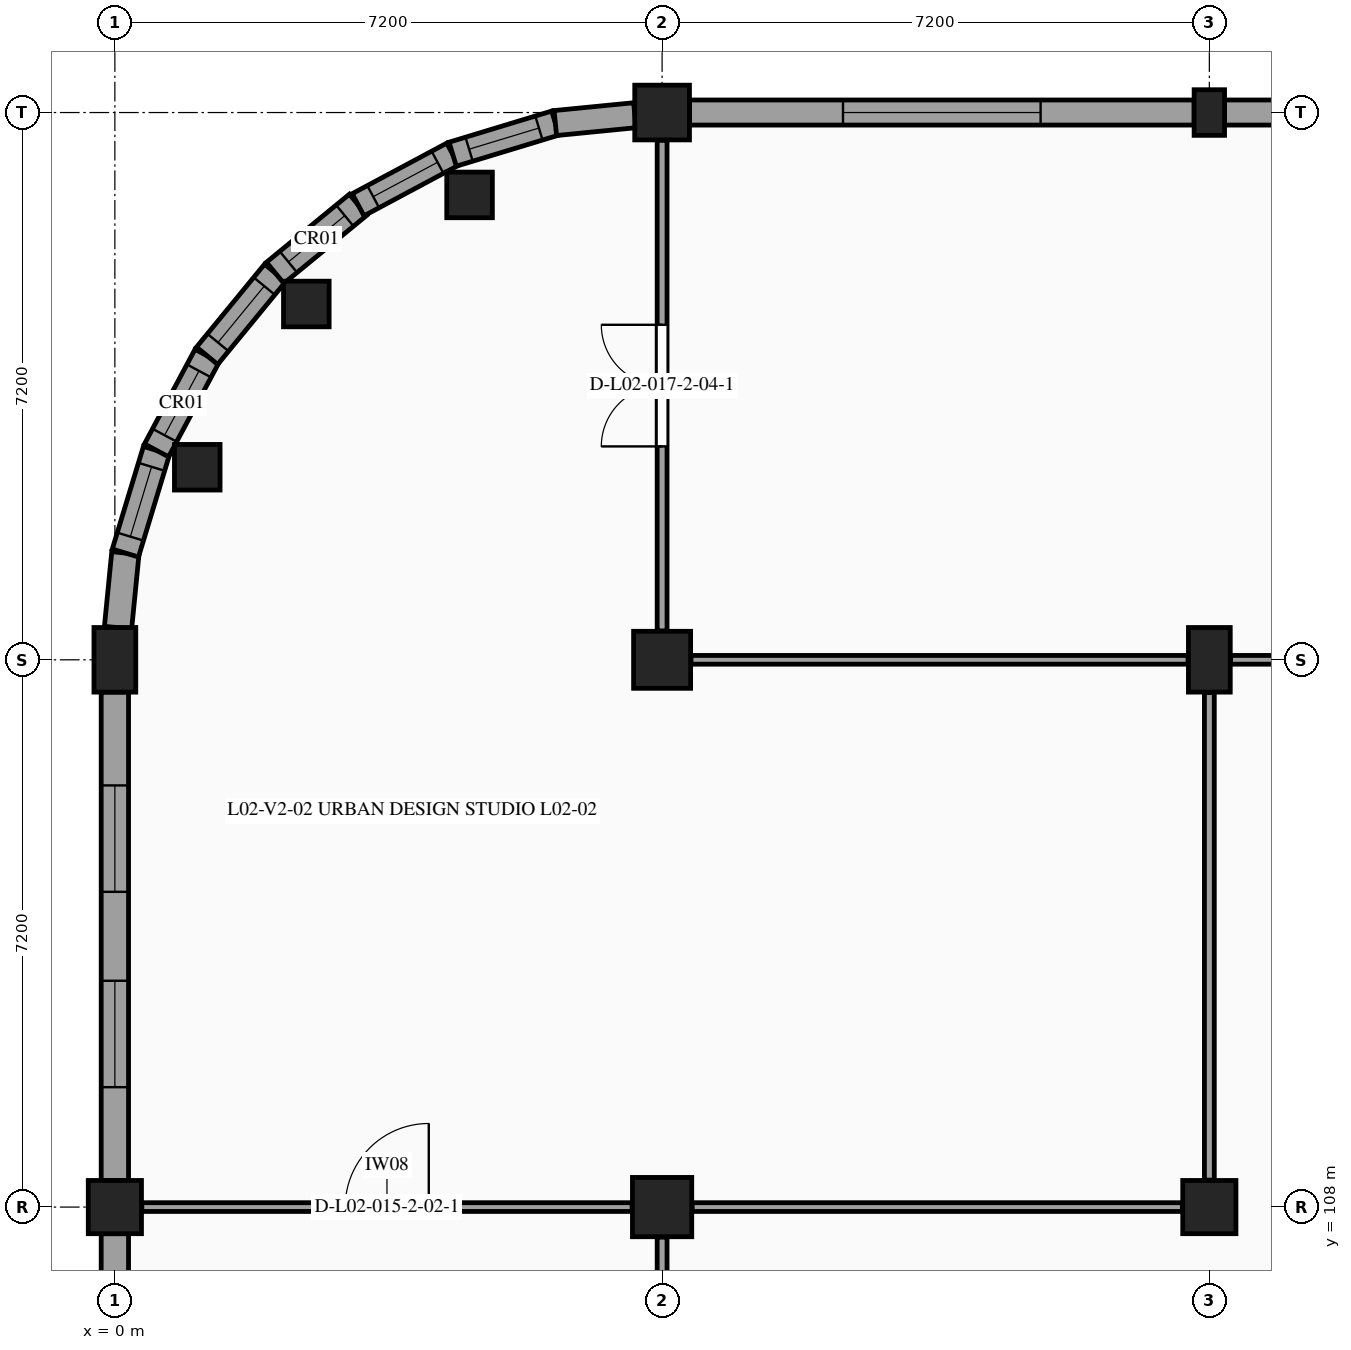
"""IFC4 building model, lengths in metres.
Left out: names, types, materials, properties, quantities, classifications, styles, units other than length and angle.
Written with IfcOpenShell. Run it as: python <this file> out.ifc"""

import sys

from ifc_helpers import new_model, si_unit, direction, frame, frame_2d, origin, origin_2d, place, context, subcontext, project, spatial, rectangle, circle, extrude, element, fill, save


model = new_model("IFC4")
c1 = context("Model", 3, precision=1e-05, world=origin(), true_north=direction((0.0, 1.0)))
c2 = subcontext(c1, "Body", "Model", "MODEL_VIEW")
j1 = project(units=[si_unit("LENGTHUNIT", "METRE"), si_unit("PLANEANGLEUNIT", "RADIAN")], contexts=[c1])
p1 = place(None, origin())
s1 = spatial("IfcSite", under=j1, at=p1, CompositionType="ELEMENT")
p2 = place(p1, origin())
s2 = spatial("IfcBuilding", under=s1, at=p2, CompositionType="ELEMENT")
p3 = place(p2, frame((0.0, 0.0, 9.9)))
s3 = spatial("IfcBuildingStorey", under=s2, at=p3, CompositionType="ELEMENT", Elevation=9.9)
p4 = place(p3, frame((0.0, 108.0, 0.0), z_axis=(0.0, 0.0, 1.0), x_axis=(1.0, 0.0, 0.0)))
e1 = element("IfcColumn", 1, at=p4, inside=s3, PredefinedType="COLUMN", context=c2, shape_type="SweptSolid", body=[
    extrude(rectangle(XDim=0.7, YDim=0.7, at=origin_2d()), origin(), (0.0, 0.0, 1.0), 4.5),
])
p5 = place(p3, frame((0.0, 115.2, 0.0), z_axis=(0.0, 0.0, 1.0), x_axis=(1.0, 0.0, 0.0)))
e2 = element("IfcColumn", 2, at=p5, inside=s3, PredefinedType="COLUMN", context=c2, shape_type="SweptSolid", body=[
    extrude(rectangle(XDim=0.55, YDim=0.85, at=origin_2d()), origin(), (0.0, 0.0, 1.0), 4.5),
])
p6 = place(p3, frame((7.2, 108.0, 0.0), z_axis=(0.0, 0.0, 1.0), x_axis=(1.0, 0.0, 0.0)))
e3 = element("IfcColumn", 3, at=p6, inside=s3, PredefinedType="COLUMN", context=c2, shape_type="SweptSolid", body=[
    extrude(rectangle(XDim=0.78, YDim=0.78, at=origin_2d()), origin(), (0.0, 0.0, 1.0), 4.5),
])
p7 = place(p3, frame((7.2, 115.2, 0.0), z_axis=(0.0, 0.0, 1.0), x_axis=(1.0, 0.0, 0.0)))
e4 = element("IfcColumn", 4, at=p7, inside=s3, PredefinedType="COLUMN", context=c2, shape_type="SweptSolid", body=[
    extrude(rectangle(XDim=0.75, YDim=0.75, at=origin_2d()), origin(), (0.0, 0.0, 1.0), 4.5),
])
p8 = place(p3, frame((7.2, 122.4, 0.0), z_axis=(0.0, 0.0, 1.0), x_axis=(1.0, 0.0, 0.0)))
e5 = element("IfcColumn", 5, at=p8, inside=s3, PredefinedType="COLUMN", context=c2, shape_type="SweptSolid", body=[
    extrude(rectangle(XDim=0.72, YDim=0.72, at=origin_2d()), origin(), (0.0, 0.0, 1.0), 4.5),
])
p9 = place(p3, frame((14.4, 108.0, 0.0), z_axis=(0.0, 0.0, 1.0), x_axis=(1.0, 0.0, 0.0)))
e6 = element("IfcColumn", 6, at=p9, inside=s3, PredefinedType="COLUMN", context=c2, shape_type="SweptSolid", body=[
    extrude(rectangle(XDim=0.7, YDim=0.7, at=origin_2d()), origin(), (0.0, 0.0, 1.0), 4.5),
])
p10 = place(p3, frame((14.4, 115.2, 0.0), z_axis=(0.0, 0.0, 1.0), x_axis=(1.0, 0.0, 0.0)))
e7 = element("IfcColumn", 7, at=p10, inside=s3, PredefinedType="COLUMN", context=c2, shape_type="SweptSolid", body=[
    extrude(rectangle(XDim=0.55, YDim=0.85, at=origin_2d()), origin(), (0.0, 0.0, 1.0), 4.5),
])
p11 = place(p3, frame((14.4, 122.4, 0.0), z_axis=(0.0, 0.0, 1.0), x_axis=(1.0, 0.0, 0.0)))
e8 = element("IfcColumn", 8, at=p11, inside=s3, PredefinedType="PILASTER", context=c2, shape_type="SweptSolid", body=[
    extrude(rectangle(XDim=0.4, YDim=0.6, at=origin_2d()), origin(), (0.0, 0.0, 1.0), 4.5),
])
for number, where, z_axis, x_axis in (
    (9, (4.667, 121.316, 0.0), (0.0, 0.0, 1.0), (1.0, 0.0, 0.0)),
    (10, (2.519, 119.881, 0.0), (0.0, 0.0, 1.0), (1.0, 0.0, 0.0)),
    (11, (1.084, 117.733, 0.0), (0.0, 0.0, 1.0), (1.0, 0.0, 0.0)),
):
    element("IfcColumn", number, at=place(p3, frame(where, z_axis=z_axis, x_axis=x_axis)), inside=s3, PredefinedType="COLUMN", context=c2, shape_type="SweptSolid", body=[
        extrude(circle(Radius=0.3, at=origin_2d()), origin(), (0.0, 0.0, 1.0), 4.5),
    ])
p12 = place(p3, frame((0.0, 101.16, 0.0), z_axis=(0.0, 0.0, 1.0), x_axis=(0.0, 1.0, 0.0)))
e12 = element("IfcWall", 12, at=p12, inside=s3, PredefinedType="STANDARD", context=c2, shape_type="SweptSolid", body=[
    extrude(rectangle(XDim=6.49, YDim=0.36, at=frame_2d((3.245, 0.0))), origin(), (0.0, 0.0, 1.0), 3.47),
])
p13 = place(p12, frame((1.172, 0.0, 1.15)))
e13 = element("IfcOpeningElement", 13, at=p13, cuts=e12, PredefinedType="OPENING", context=c2, shape_type="SweptSolid", body=[
    extrude(rectangle(XDim=1.55, YDim=1.35, at=frame_2d((0.775, 0.675))), frame((0.0, 0.19, 0.0), z_axis=(0.0, -1.0, 0.0), x_axis=(1.0, 0.0, 0.0)), (0.0, 0.0, 1.0), 0.38),
])
p14 = place(p12, frame((3.768, 0.0, 1.15)))
e14 = element("IfcOpeningElement", 14, at=p14, cuts=e12, PredefinedType="OPENING", context=c2, shape_type="SweptSolid", body=[
    extrude(rectangle(XDim=1.55, YDim=1.35, at=frame_2d((0.775, 0.675))), frame((0.0, 0.19, 0.0), z_axis=(0.0, -1.0, 0.0), x_axis=(1.0, 0.0, 0.0)), (0.0, 0.0, 1.0), 0.38),
])
p15 = place(p3, frame((0.0, 108.35, 0.0), z_axis=(0.0, 0.0, 1.0), x_axis=(0.0, 1.0, 0.0)))
e15 = element("IfcWall", 15, at=p15, inside=s3, PredefinedType="STANDARD", context=c2, shape_type="SweptSolid", body=[
    extrude(rectangle(XDim=6.425, YDim=0.36, at=frame_2d((3.212, 0.0))), origin(), (0.0, 0.0, 1.0), 3.47),
])
p16 = place(p15, frame((1.228, 0.0, 1.15)))
e16 = element("IfcOpeningElement", 16, at=p16, cuts=e15, PredefinedType="OPENING", context=c2, shape_type="SweptSolid", body=[
    extrude(rectangle(XDim=1.4, YDim=1.3, at=frame_2d((0.7, 0.65))), frame((0.0, 0.19, 0.0), z_axis=(0.0, -1.0, 0.0), x_axis=(1.0, 0.0, 0.0)), (0.0, 0.0, 1.0), 0.38),
])
p17 = place(p15, frame((3.798, 0.0, 1.15)))
e17 = element("IfcOpeningElement", 17, at=p17, cuts=e15, PredefinedType="OPENING", context=c2, shape_type="SweptSolid", body=[
    extrude(rectangle(XDim=1.4, YDim=1.3, at=frame_2d((0.7, 0.65))), frame((0.0, 0.19, 0.0), z_axis=(0.0, -1.0, 0.0), x_axis=(1.0, 0.0, 0.0)), (0.0, 0.0, 1.0), 0.38),
])
p18 = place(p3, frame((0.042, 115.623, 0.0), z_axis=(0.0, 0.0, 1.0), x_axis=(0.09800882272, 0.99518554585, 0.0)))
e18 = element("IfcWall", 18, at=p18, inside=s3, PredefinedType="STANDARD", context=c2, shape_type="SweptSolid", body=[
    extrude(rectangle(XDim=0.986, YDim=0.36, at=frame_2d((0.493, 0.0))), origin(), (0.0, 0.0, 1.0), 4.225),
])
p19 = place(p3, frame((0.138, 116.605, 0.0), z_axis=(0.0, 0.0, 1.0), x_axis=(0.290266641956, 0.956945806495, 0.0)))
e19 = element("IfcWall", 19, at=p19, inside=s3, PredefinedType="STANDARD", context=c2, shape_type="SweptSolid", body=[
    extrude(rectangle(XDim=1.411, YDim=0.36, at=frame_2d((0.706, 0.0))), origin(), (0.0, 0.0, 1.0), 4.225),
])
p20 = place(p19, frame((0.226, 0.0, 1.0)))
e20 = element("IfcOpeningElement", 20, at=p20, cuts=e19, PredefinedType="OPENING", context=c2, shape_type="SweptSolid", body=[
    extrude(rectangle(XDim=0.96, YDim=1.4, at=frame_2d((0.48, 0.7))), frame((0.0, 0.19, 0.0), z_axis=(0.0, -1.0, 0.0), x_axis=(1.0, 0.0, 0.0)), (0.0, 0.0, 1.0), 0.38),
])
p21 = place(p3, frame((0.548, 117.955, 0.0), z_axis=(0.0, 0.0, 1.0), x_axis=(0.471333199182, 0.881955222984, 0.0)))
e21 = element("IfcWall", 21, at=p21, inside=s3, PredefinedType="STANDARD", context=c2, shape_type="SweptSolid", body=[
    extrude(rectangle(XDim=1.411, YDim=0.36, at=frame_2d((0.706, 0.0))), origin(), (0.0, 0.0, 1.0), 4.225),
])
p22 = place(p21, frame((0.226, 0.0, 1.0)))
e22 = element("IfcOpeningElement", 22, at=p22, cuts=e21, PredefinedType="OPENING", context=c2, shape_type="SweptSolid", body=[
    extrude(rectangle(XDim=0.96, YDim=1.4, at=frame_2d((0.48, 0.7))), frame((0.0, 0.19, 0.0), z_axis=(0.0, -1.0, 0.0), x_axis=(1.0, 0.0, 0.0)), (0.0, 0.0, 1.0), 0.38),
])
p23 = place(p3, frame((1.213, 119.2, 0.0), z_axis=(0.0, 0.0, 1.0), x_axis=(0.634433227965, 0.772977670605, 0.0)))
e23 = element("IfcWall", 23, at=p23, inside=s3, PredefinedType="STANDARD", context=c2, shape_type="SweptSolid", body=[
    extrude(rectangle(XDim=1.412, YDim=0.36, at=frame_2d((0.706, 0.0))), origin(), (0.0, 0.0, 1.0), 4.225),
])
p24 = place(p23, frame((0.226, 0.0, 1.0)))
e24 = element("IfcOpeningElement", 24, at=p24, cuts=e23, PredefinedType="OPENING", context=c2, shape_type="SweptSolid", body=[
    extrude(rectangle(XDim=0.96, YDim=1.4, at=frame_2d((0.48, 0.7))), frame((0.0, 0.19, 0.0), z_axis=(0.0, -1.0, 0.0), x_axis=(1.0, 0.0, 0.0)), (0.0, 0.0, 1.0), 0.38),
])
p25 = place(p3, frame((2.109, 120.291, 0.0), z_axis=(0.0, 0.0, 1.0), x_axis=(0.773062495189, 0.63432986571, 0.0)))
e25 = element("IfcWall", 25, at=p25, inside=s3, PredefinedType="STANDARD", context=c2, shape_type="SweptSolid", body=[
    extrude(rectangle(XDim=1.411, YDim=0.36, at=frame_2d((0.706, 0.0))), origin(), (0.0, 0.0, 1.0), 4.225),
])
p26 = place(p25, frame((0.226, 0.0, 1.0)))
e26 = element("IfcOpeningElement", 26, at=p26, cuts=e25, PredefinedType="OPENING", context=c2, shape_type="SweptSolid", body=[
    extrude(rectangle(XDim=0.96, YDim=1.4, at=frame_2d((0.48, 0.7))), frame((0.0, 0.19, 0.0), z_axis=(0.0, -1.0, 0.0), x_axis=(1.0, 0.0, 0.0)), (0.0, 0.0, 1.0), 0.38),
])
p27 = place(p3, frame((3.2, 121.187, 0.0), z_axis=(0.0, 0.0, 1.0), x_axis=(0.881844864465, 0.471539643102, 0.0)))
e27 = element("IfcWall", 27, at=p27, inside=s3, PredefinedType="STANDARD", context=c2, shape_type="SweptSolid", body=[
    extrude(rectangle(XDim=1.411, YDim=0.33, at=frame_2d((0.706, 0.0))), origin(), (0.0, 0.0, 1.0), 4.225),
])
p28 = place(p27, frame((0.226, 0.0, 1.0)))
e28 = element("IfcOpeningElement", 28, at=p28, cuts=e27, PredefinedType="OPENING", context=c2, shape_type="SweptSolid", body=[
    extrude(rectangle(XDim=0.96, YDim=1.4, at=frame_2d((0.48, 0.7))), frame((0.0, 0.175, 0.0), z_axis=(0.0, -1.0, 0.0), x_axis=(1.0, 0.0, 0.0)), (0.0, 0.0, 1.0), 0.35),
])
p29 = place(p3, frame((4.445, 121.852, 0.0), z_axis=(0.0, 0.0, 1.0), x_axis=(0.95696037757, 0.290218599957, 0.0)))
e29 = element("IfcWall", 29, at=p29, inside=s3, PredefinedType="STANDARD", context=c2, shape_type="SweptSolid", body=[
    extrude(rectangle(XDim=1.412, YDim=0.33, at=frame_2d((0.706, 0.0))), origin(), (0.0, 0.0, 1.0), 4.225),
])
p30 = place(p29, frame((0.226, 0.0, 1.0)))
e30 = element("IfcOpeningElement", 30, at=p30, cuts=e29, PredefinedType="OPENING", context=c2, shape_type="SweptSolid", body=[
    extrude(rectangle(XDim=0.96, YDim=1.4, at=frame_2d((0.48, 0.7))), frame((0.0, 0.175, 0.0), z_axis=(0.0, -1.0, 0.0), x_axis=(1.0, 0.0, 0.0)), (0.0, 0.0, 1.0), 0.35),
])
p31 = place(p3, frame((5.795, 122.262, 0.0), z_axis=(0.0, 0.0, 1.0), x_axis=(0.995187764733, 0.097986289481, 0.0)))
e31 = element("IfcWall", 31, at=p31, inside=s3, PredefinedType="STANDARD", context=c2, shape_type="SweptSolid", body=[
    extrude(rectangle(XDim=1.052, YDim=0.33, at=frame_2d((0.526, 0.0))), origin(), (0.0, 0.0, 1.0), 4.225),
])
p32 = place(p3, frame((7.56, 122.4, 0.0), z_axis=(0.0, 0.0, 1.0), x_axis=(1.0, 0.0, 0.0)))
e32 = element("IfcWall", 32, at=p32, inside=s3, PredefinedType="STANDARD", context=c2, shape_type="SweptSolid", body=[
    extrude(rectangle(XDim=6.64, YDim=0.33, at=frame_2d((3.32, 0.0))), origin(), (0.0, 0.0, 1.0), 3.47),
])
p33 = place(p32, frame((2.02, 0.0, 0.98)))
e33 = element("IfcOpeningElement", 33, at=p33, cuts=e32, PredefinedType="OPENING", context=c2, shape_type="SweptSolid", body=[
    extrude(rectangle(XDim=2.6, YDim=1.5, at=frame_2d((1.3, 0.75))), frame((0.0, 0.175, 0.0), z_axis=(0.0, -1.0, 0.0), x_axis=(1.0, 0.0, 0.0)), (0.0, 0.0, 1.0), 0.35),
])
p34 = place(p3, frame((14.6, 122.4, 0.0), z_axis=(0.0, 0.0, 1.0), x_axis=(1.0, 0.0, 0.0)))
e34 = element("IfcWall", 34, at=p34, inside=s3, PredefinedType="STANDARD", context=c2, shape_type="SweptSolid", body=[
    extrude(rectangle(XDim=6.64, YDim=0.33, at=frame_2d((3.32, 0.0))), origin(), (0.0, 0.0, 1.0), 3.47),
])
p35 = place(p34, frame((2.22, 0.0, 0.98)))
e35 = element("IfcOpeningElement", 35, at=p35, cuts=e34, PredefinedType="OPENING", context=c2, shape_type="SweptSolid", body=[
    extrude(rectangle(XDim=2.2, YDim=1.45, at=frame_2d((1.1, 0.725))), frame((0.0, 0.175, 0.0), z_axis=(0.0, -1.0, 0.0), x_axis=(1.0, 0.0, 0.0)), (0.0, 0.0, 1.0), 0.35),
])
p36 = place(p3, frame((7.2, 101.105, 0.0), z_axis=(0.0, 0.0, 1.0), x_axis=(0.0, 1.0, 0.0)))
e36 = element("IfcWall", 36, at=p36, inside=s3, PredefinedType="PARTITIONING", context=c2, shape_type="SweptSolid", body=[
    extrude(rectangle(XDim=6.5, YDim=0.13, at=frame_2d((3.25, 0.0))), origin(), (0.0, 0.0, 1.0), 3.54),
])
p37 = place(p36, frame((2.45, 0.0, 0.0)))
e37 = element("IfcOpeningElement", 37, at=p37, cuts=e36, PredefinedType="OPENING", context=c2, shape_type="SweptSolid", body=[
    extrude(rectangle(XDim=1.6, YDim=2.2, at=frame_2d((0.8, 1.1))), frame((0.0, 0.075, 0.0), z_axis=(0.0, -1.0, 0.0), x_axis=(1.0, 0.0, 0.0)), (0.0, 0.0, 1.0), 0.15),
])
p38 = place(p3, frame((0.355, 108.0, 0.0), z_axis=(0.0, 0.0, 1.0), x_axis=(1.0, 0.0, 0.0)))
e38 = element("IfcWall", 38, at=p38, inside=s3, PredefinedType="PARTITIONING", context=c2, shape_type="SweptSolid", body=[
    extrude(rectangle(XDim=6.45, YDim=0.115, at=frame_2d((3.225, 0.0))), origin(), (0.0, 0.0, 1.0), 3.485),
])
p39 = place(p38, frame((2.675, 0.0, 0.0)))
e39 = element("IfcOpeningElement", 39, at=p39, cuts=e38, PredefinedType="OPENING", context=c2, shape_type="SweptSolid", body=[
    extrude(rectangle(XDim=1.1, YDim=2.15, at=frame_2d((0.55, 1.075))), frame((0.0, 0.067, 0.0), z_axis=(0.0, -1.0, 0.0), x_axis=(1.0, 0.0, 0.0)), (0.0, 0.0, 1.0), 0.135),
])
p40 = place(p3, frame((7.2, 115.58, 0.0), z_axis=(0.0, 0.0, 1.0), x_axis=(0.0, 1.0, 0.0)))
e40 = element("IfcWall", 40, at=p40, inside=s3, PredefinedType="PARTITIONING", context=c2, shape_type="SweptSolid", body=[
    extrude(rectangle(XDim=6.455, YDim=0.13, at=frame_2d((3.228, 0.0))), origin(), (0.0, 0.0, 1.0), 3.53),
])
p41 = place(p40, frame((2.427, 0.0, 0.0)))
e41 = element("IfcOpeningElement", 41, at=p41, cuts=e40, PredefinedType="OPENING", context=c2, shape_type="SweptSolid", body=[
    extrude(rectangle(XDim=1.6, YDim=2.2, at=frame_2d((0.8, 1.1))), frame((0.0, 0.075, 0.0), z_axis=(0.0, -1.0, 0.0), x_axis=(1.0, 0.0, 0.0)), (0.0, 0.0, 1.0), 0.15),
])
p42 = place(p3, frame((7.595, 108.0, 0.0), z_axis=(0.0, 0.0, 1.0), x_axis=(1.0, 0.0, 0.0)))
e42 = element("IfcWall", 42, at=p42, inside=s3, PredefinedType="PARTITIONING", context=c2, shape_type="SweptSolid", body=[
    extrude(rectangle(XDim=6.45, YDim=0.115, at=frame_2d((3.225, 0.0))), origin(), (0.0, 0.0, 1.0), 3.5),
])
p43 = place(p3, frame((14.4, 108.355, 0.0), z_axis=(0.0, 0.0, 1.0), x_axis=(0.0, 1.0, 0.0)))
e43 = element("IfcWall", 43, at=p43, inside=s3, PredefinedType="PARTITIONING", context=c2, shape_type="SweptSolid", body=[
    extrude(rectangle(XDim=6.415, YDim=0.13, at=frame_2d((3.208, 0.0))), origin(), (0.0, 0.0, 1.0), 3.535),
])
p44 = place(p3, frame((7.58, 115.2, 0.0), z_axis=(0.0, 0.0, 1.0), x_axis=(1.0, 0.0, 0.0)))
e44 = element("IfcWall", 44, at=p44, inside=s3, PredefinedType="PARTITIONING", context=c2, shape_type="SweptSolid", body=[
    extrude(rectangle(XDim=6.54, YDim=0.115, at=frame_2d((3.27, 0.0))), origin(), (0.0, 0.0, 1.0), 3.5),
])
p45 = place(p3, frame((14.68, 115.2, 0.0), z_axis=(0.0, 0.0, 1.0), x_axis=(1.0, 0.0, 0.0)))
e45 = element("IfcWall", 45, at=p45, inside=s3, PredefinedType="PARTITIONING", context=c2, shape_type="SweptSolid", body=[
    extrude(rectangle(XDim=6.54, YDim=0.115, at=frame_2d((3.27, 0.0))), origin(), (0.0, 0.0, 1.0), 3.505),
])
p46 = place(p16, origin())
e46 = element("IfcWindow", 46, at=p46, inside=s3, PartitioningType="SINGLE_PANEL", PredefinedType="WINDOW", context=c2, shape_type="SweptSolid", body=[
    extrude(rectangle(XDim=1.4, YDim=1.3, at=frame_2d((0.7, 0.65))), frame((0.0, -0.08, 0.0), z_axis=(0.0, -1.0, 0.0), x_axis=(1.0, 0.0, 0.0)), (0.0, 0.0, 1.0), 0.06),
])
fill(e16, e46)
p47 = place(p17, origin())
e47 = element("IfcWindow", 47, at=p47, inside=s3, PartitioningType="SINGLE_PANEL", PredefinedType="WINDOW", context=c2, shape_type="SweptSolid", body=[
    extrude(rectangle(XDim=1.4, YDim=1.3, at=frame_2d((0.7, 0.65))), frame((0.0, -0.08, 0.0), z_axis=(0.0, -1.0, 0.0), x_axis=(1.0, 0.0, 0.0)), (0.0, 0.0, 1.0), 0.06),
])
fill(e17, e47)
p48 = place(p20, origin())
e48 = element("IfcWindow", 48, at=p48, inside=s3, PartitioningType="SINGLE_PANEL", PredefinedType="WINDOW", context=c2, shape_type="SweptSolid", body=[
    extrude(rectangle(XDim=0.96, YDim=1.4, at=frame_2d((0.48, 0.7))), frame((0.0, -0.01, 0.0), z_axis=(0.0, -1.0, 0.0), x_axis=(1.0, 0.0, 0.0)), (0.0, 0.0, 1.0), 0.06),
])
fill(e20, e48)
p49 = place(p22, origin())
e49 = element("IfcWindow", 49, at=p49, inside=s3, PartitioningType="SINGLE_PANEL", PredefinedType="WINDOW", context=c2, shape_type="SweptSolid", body=[
    extrude(rectangle(XDim=0.96, YDim=1.4, at=frame_2d((0.48, 0.7))), frame((0.0, -0.01, 0.0), z_axis=(0.0, -1.0, 0.0), x_axis=(1.0, 0.0, 0.0)), (0.0, 0.0, 1.0), 0.06),
])
fill(e22, e49)
p50 = place(p24, origin())
e50 = element("IfcWindow", 50, at=p50, inside=s3, PartitioningType="SINGLE_PANEL", PredefinedType="WINDOW", context=c2, shape_type="SweptSolid", body=[
    extrude(rectangle(XDim=0.96, YDim=1.4, at=frame_2d((0.48, 0.7))), frame((0.0, -0.01, 0.0), z_axis=(0.0, -1.0, 0.0), x_axis=(1.0, 0.0, 0.0)), (0.0, 0.0, 1.0), 0.06),
])
fill(e24, e50)
p51 = place(p26, origin())
e51 = element("IfcWindow", 51, at=p51, inside=s3, PartitioningType="SINGLE_PANEL", PredefinedType="WINDOW", context=c2, shape_type="SweptSolid", body=[
    extrude(rectangle(XDim=0.96, YDim=1.4, at=frame_2d((0.48, 0.7))), frame((0.0, -0.01, 0.0), z_axis=(0.0, -1.0, 0.0), x_axis=(1.0, 0.0, 0.0)), (0.0, 0.0, 1.0), 0.06),
])
fill(e26, e51)
p52 = place(p28, origin())
e52 = element("IfcWindow", 52, at=p52, inside=s3, PartitioningType="SINGLE_PANEL", PredefinedType="WINDOW", context=c2, shape_type="SweptSolid", body=[
    extrude(rectangle(XDim=0.96, YDim=1.4, at=frame_2d((0.48, 0.7))), frame((0.0, -0.01, 0.0), z_axis=(0.0, -1.0, 0.0), x_axis=(1.0, 0.0, 0.0)), (0.0, 0.0, 1.0), 0.06),
])
fill(e28, e52)
p53 = place(p30, origin())
e53 = element("IfcWindow", 53, at=p53, inside=s3, PartitioningType="SINGLE_PANEL", PredefinedType="WINDOW", context=c2, shape_type="SweptSolid", body=[
    extrude(rectangle(XDim=0.96, YDim=1.4, at=frame_2d((0.48, 0.7))), frame((0.0, -0.01, 0.0), z_axis=(0.0, -1.0, 0.0), x_axis=(1.0, 0.0, 0.0)), (0.0, 0.0, 1.0), 0.06),
])
fill(e30, e53)
p54 = place(p33, origin())
e54 = element("IfcWindow", 54, at=p54, inside=s3, PartitioningType="SINGLE_PANEL", PredefinedType="WINDOW", context=c2, shape_type="SweptSolid", body=[
    extrude(rectangle(XDim=2.6, YDim=1.5, at=frame_2d((1.3, 0.75))), frame((0.0, -0.03, 0.0), z_axis=(0.0, -1.0, 0.0), x_axis=(1.0, 0.0, 0.0)), (0.0, 0.0, 1.0), 0.06),
])
fill(e33, e54)
p55 = place(p39, origin())
e55 = element("IfcDoor", 55, at=p55, inside=s3, OperationType="SINGLE_SWING_RIGHT", PredefinedType="DOOR", context=c2, shape_type="SweptSolid", body=[
    extrude(rectangle(XDim=1.1, YDim=2.15, at=frame_2d((0.55, 1.075))), frame((0.0, 0.025, 0.0), z_axis=(0.0, -1.0, 0.0), x_axis=(1.0, 0.0, 0.0)), (0.0, 0.0, 1.0), 0.05),
])
fill(e39, e55)
p56 = place(p41, origin())
e56 = element("IfcDoor", 56, at=p56, inside=s3, OperationType="DOUBLE_DOOR_SINGLE_SWING", PredefinedType="DOOR", context=c2, shape_type="SweptSolid", body=[
    extrude(rectangle(XDim=1.6, YDim=2.2, at=frame_2d((0.8, 1.1))), frame((0.0, 0.025, 0.0), z_axis=(0.0, -1.0, 0.0), x_axis=(1.0, 0.0, 0.0)), (0.0, 0.0, 1.0), 0.05),
])
fill(e41, e56)
save(model, sys.argv[1])
